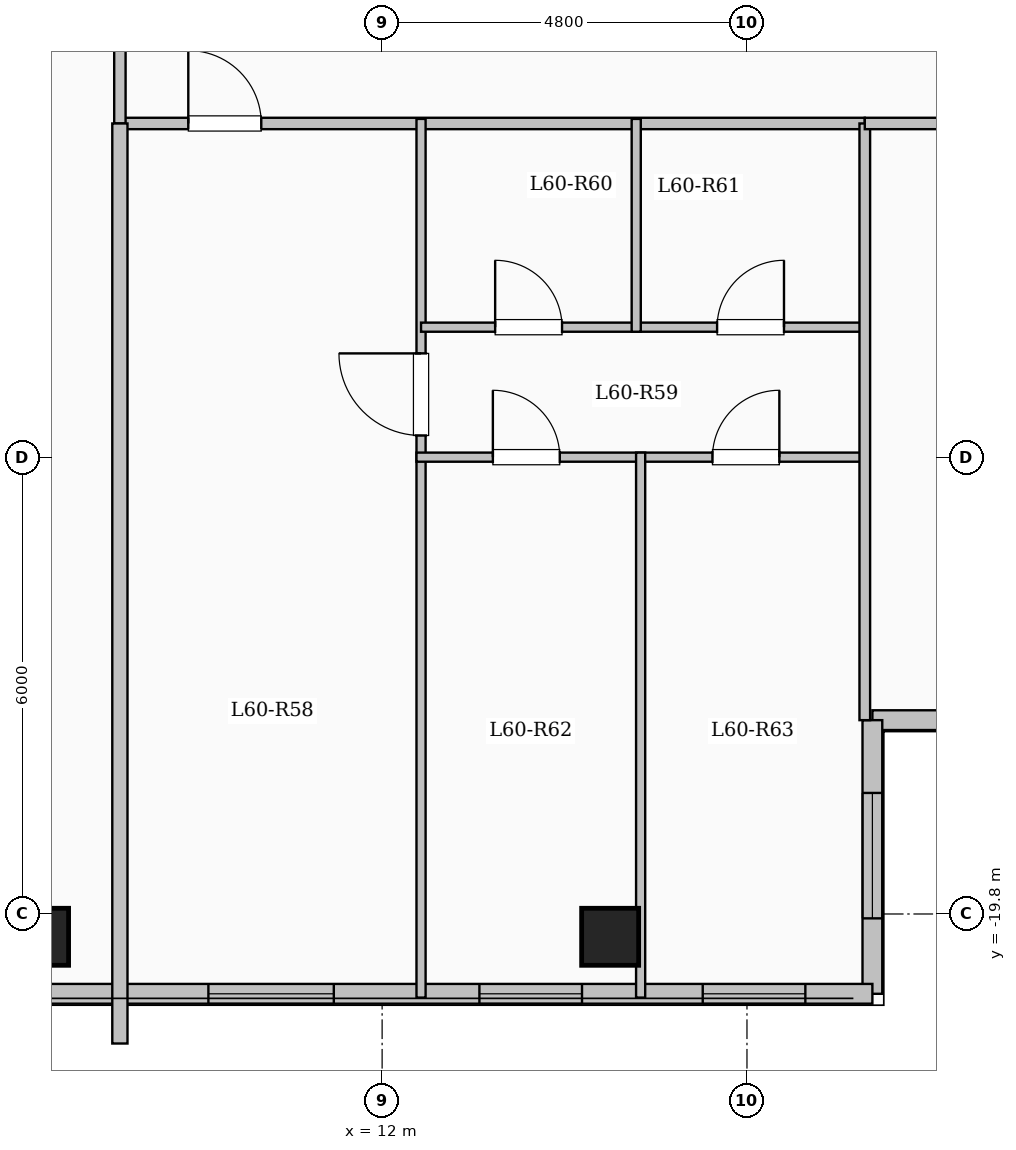
"""IFC4 building model, lengths in metres.
Left out: names, types, materials, properties, quantities, classifications, styles, units other than length and angle.
Written with IfcOpenShell. Run it as: python <this file> out.ifc"""

import sys

from ifc_helpers import new_model, si_unit, direction, frame, frame_2d, origin, origin_2d, place, context, subcontext, project, spatial, rectangle, extrude, element, fill, save


model = new_model("IFC4")
c1 = context("Model", 3, precision=1e-05, world=origin(), true_north=direction((0.0, 1.0)))
c2 = subcontext(c1, "Body", "Model", "MODEL_VIEW")
j1 = project(units=[si_unit("LENGTHUNIT", "METRE"), si_unit("PLANEANGLEUNIT", "RADIAN")], contexts=[c1])
p1 = place(None, origin())
s1 = spatial("IfcSite", under=j1, at=p1, CompositionType="ELEMENT")
p2 = place(p1, origin())
s2 = spatial("IfcBuilding", under=s1, at=p2, CompositionType="ELEMENT")
p3 = place(p2, frame((0.0, 0.0, 220.4)))
s3 = spatial("IfcBuildingStorey", under=s2, at=p3, CompositionType="ELEMENT", Elevation=220.4)
for number, where, z_axis, x_axis in (
    (1, (7.5, -20.1, 0.0), (0.0, 0.0, 1.0), (1.0, 0.0, 0.0)),
    (2, (15.0, -20.1, 0.0), (0.0, 0.0, 1.0), (1.0, 0.0, 0.0)),
):
    element("IfcColumn", number, at=place(p3, frame(where, z_axis=z_axis, x_axis=x_axis)), inside=s3, PredefinedType="COLUMN", context=c2, shape_type="SweptSolid", body=[
        extrude(rectangle(XDim=0.75, YDim=0.75, at=origin_2d()), origin(), (0.0, 0.0, 1.0), 3.35),
    ])
p4 = place(p3, frame((23.55, -17.25, 0.0), z_axis=(0.0, 0.0, 1.0), x_axis=(-1.0, 0.0, 0.0)))
e3 = element("IfcWall", 3, at=p4, inside=s3, PredefinedType="SOLIDWALL", context=c2, shape_type="SweptSolid", body=[
    extrude(rectangle(XDim=5.1, YDim=0.26, at=frame_2d((2.55, 0.0))), origin(), (0.0, 0.0, 1.0), 3.1),
])
p5 = place(p4, frame((1.475, 0.0, 0.9)))
e4 = element("IfcOpeningElement", 4, at=p5, cuts=e3, PredefinedType="OPENING", context=c2, shape_type="SweptSolid", body=[
    extrude(rectangle(XDim=2.2, YDim=1.75, at=frame_2d((1.1, 0.875))), frame((0.0, 0.14, 0.0), z_axis=(0.0, -1.0, 0.0), x_axis=(1.0, 0.0, 0.0)), (0.0, 0.0, 1.0), 0.28),
])
p6 = place(p3, frame((18.45, -17.25, 0.0), z_axis=(0.0, 0.0, 1.0), x_axis=(0.0, -1.0, 0.0)))
e5 = element("IfcWall", 5, at=p6, inside=s3, PredefinedType="SOLIDWALL", context=c2, shape_type="SweptSolid", body=[
    extrude(rectangle(XDim=3.6, YDim=0.26, at=frame_2d((1.8, 0.0))), origin(), (0.0, 0.0, 1.0), 3.1),
])
p7 = place(p6, frame((0.958, 0.0, 0.9)))
e6 = element("IfcOpeningElement", 6, at=p7, cuts=e5, PredefinedType="OPENING", context=c2, shape_type="SweptSolid", body=[
    extrude(rectangle(XDim=1.65, YDim=1.6, at=frame_2d((0.825, 0.8))), frame((0.0, 0.14, 0.0), z_axis=(0.0, -1.0, 0.0), x_axis=(1.0, 0.0, 0.0)), (0.0, 0.0, 1.0), 0.28),
])
p8 = place(p3, frame((18.45, -20.85, 0.0), z_axis=(0.0, 0.0, 1.0), x_axis=(-1.0, 0.0, 0.0)))
e7 = element("IfcWall", 7, at=p8, inside=s3, PredefinedType="SOLIDWALL", context=c2, shape_type="SweptSolid", body=[
    extrude(rectangle(XDim=11.1, YDim=0.26, at=frame_2d((5.55, 0.0))), origin(), (0.0, 0.0, 1.0), 3.1),
])
p9 = place(p8, frame((0.882, 0.0, 0.95)))
e8 = element("IfcOpeningElement", 8, at=p9, cuts=e7, PredefinedType="OPENING", context=c2, shape_type="SweptSolid", body=[
    extrude(rectangle(XDim=1.35, YDim=1.55, at=frame_2d((0.675, 0.775))), frame((0.0, 0.14, 0.0), z_axis=(0.0, -1.0, 0.0), x_axis=(1.0, 0.0, 0.0)), (0.0, 0.0, 1.0), 0.28),
])
p10 = place(p8, frame((3.82, 0.0, 0.95)))
e9 = element("IfcOpeningElement", 9, at=p10, cuts=e7, PredefinedType="OPENING", context=c2, shape_type="SweptSolid", body=[
    extrude(rectangle(XDim=1.35, YDim=1.55, at=frame_2d((0.675, 0.775))), frame((0.0, 0.14, 0.0), z_axis=(0.0, -1.0, 0.0), x_axis=(1.0, 0.0, 0.0)), (0.0, 0.0, 1.0), 0.28),
])
p11 = place(p8, frame((7.086, 0.0, 0.9)))
e10 = element("IfcOpeningElement", 10, at=p11, cuts=e7, PredefinedType="OPENING", context=c2, shape_type="SweptSolid", body=[
    extrude(rectangle(XDim=1.65, YDim=1.6, at=frame_2d((0.825, 0.8))), frame((0.0, 0.14, 0.0), z_axis=(0.0, -1.0, 0.0), x_axis=(1.0, 0.0, 0.0)), (0.0, 0.0, 1.0), 0.28),
])
p12 = place(p3, frame((8.55, -9.4, 0.0), z_axis=(0.0, 0.0, 1.0), x_axis=(1.0, 0.0, 0.0)))
e11 = element("IfcWall", 11, at=p12, inside=s3, PredefinedType="PARTITIONING", context=c2, shape_type="SweptSolid", body=[
    extrude(rectangle(XDim=9.8, YDim=0.15, at=frame_2d((4.9, 0.0))), origin(), (0.0, 0.0, 1.0), 3.1),
])
p13 = place(p12, frame((0.9, 0.0, 0.0)))
e12 = element("IfcOpeningElement", 12, at=p13, cuts=e11, PredefinedType="OPENING", context=c2, shape_type="SweptSolid", body=[
    extrude(rectangle(XDim=0.96, YDim=2.15, at=frame_2d((0.48, 1.075))), frame((0.0, 0.085, 0.0), z_axis=(0.0, -1.0, 0.0), x_axis=(1.0, 0.0, 0.0)), (0.0, 0.0, 1.0), 0.17),
])
p14 = place(p3, frame((8.55, -9.4, 0.0), z_axis=(0.0, 0.0, 1.0), x_axis=(0.0, 1.0, 0.0)))
e13 = element("IfcWall", 13, at=p14, inside=s3, PredefinedType="PARTITIONING", context=c2, shape_type="SweptSolid", body=[
    extrude(rectangle(XDim=2.15, YDim=0.15, at=frame_2d((1.075, 0.0))), origin(), (0.0, 0.0, 1.0), 3.1),
])
p15 = place(p3, frame((12.512, -20.9, 0.0), z_axis=(0.0, 0.0, 1.0), x_axis=(0.0, 1.0, 0.0)))
e14 = element("IfcWall", 14, at=p15, inside=s3, PredefinedType="PARTITIONING", context=c2, shape_type="SweptSolid", body=[
    extrude(rectangle(XDim=11.56, YDim=0.12, at=frame_2d((5.78, 0.0))), origin(), (0.0, 0.0, 1.0), 3.1),
])
p16 = place(p15, frame((7.395, 0.0, 0.0)))
e15 = element("IfcOpeningElement", 15, at=p16, cuts=e14, PredefinedType="OPENING", context=c2, shape_type="SweptSolid", body=[
    extrude(rectangle(XDim=1.08, YDim=2.15, at=frame_2d((0.54, 1.075))), frame((0.0, 0.07, 0.0), z_axis=(0.0, -1.0, 0.0), x_axis=(1.0, 0.0, 0.0)), (0.0, 0.0, 1.0), 0.14),
])
p17 = place(p3, frame((12.512, -12.08, 0.0), z_axis=(0.0, 0.0, 1.0), x_axis=(1.0, 0.0, 0.0)))
e16 = element("IfcWall", 16, at=p17, inside=s3, PredefinedType="PARTITIONING", context=c2, shape_type="SweptSolid", body=[
    extrude(rectangle(XDim=2.831, YDim=0.12, at=frame_2d((1.416, 0.0))), origin(), (0.0, 0.0, 1.0), 2.725),
])
p18 = place(p17, frame((0.975, 0.0, 0.0)))
e17 = element("IfcOpeningElement", 17, at=p18, cuts=e16, PredefinedType="OPENING", context=c2, shape_type="SweptSolid", body=[
    extrude(rectangle(XDim=0.88, YDim=2.1, at=frame_2d((0.44, 1.05))), frame((0.0, 0.07, 0.0), z_axis=(0.0, -1.0, 0.0), x_axis=(1.0, 0.0, 0.0)), (0.0, 0.0, 1.0), 0.14),
])
p19 = place(p3, frame((15.343, -12.08, 0.0), z_axis=(0.0, 0.0, 1.0), x_axis=(1.0, 0.0, 0.0)))
e18 = element("IfcWall", 18, at=p19, inside=s3, PredefinedType="PARTITIONING", context=c2, shape_type="SweptSolid", body=[
    extrude(rectangle(XDim=3.007, YDim=0.12, at=frame_2d((1.503, 0.0))), origin(), (0.0, 0.0, 1.0), 3.1),
])
p20 = place(p19, frame((1.064, 0.0, 0.0)))
e19 = element("IfcOpeningElement", 19, at=p20, cuts=e18, PredefinedType="OPENING", context=c2, shape_type="SweptSolid", body=[
    extrude(rectangle(XDim=0.88, YDim=2.1, at=frame_2d((0.44, 1.05))), frame((0.0, 0.07, 0.0), z_axis=(0.0, -1.0, 0.0), x_axis=(1.0, 0.0, 0.0)), (0.0, 0.0, 1.0), 0.14),
])
p21 = place(p3, frame((12.452, -13.79, 0.0), z_axis=(0.0, 0.0, 1.0), x_axis=(1.0, 0.0, 0.0)))
e20 = element("IfcWall", 20, at=p21, inside=s3, PredefinedType="PARTITIONING", context=c2, shape_type="SweptSolid", body=[
    extrude(rectangle(XDim=5.958, YDim=0.12, at=frame_2d((2.979, 0.0))), origin(), (0.0, 0.0, 1.0), 2.725),
])
p22 = place(p21, frame((1.005, 0.0, 0.0)))
e21 = element("IfcOpeningElement", 21, at=p22, cuts=e20, PredefinedType="OPENING", context=c2, shape_type="SweptSolid", body=[
    extrude(rectangle(XDim=0.88, YDim=2.1, at=frame_2d((0.44, 1.05))), frame((0.0, 0.07, 0.0), z_axis=(0.0, -1.0, 0.0), x_axis=(1.0, 0.0, 0.0)), (0.0, 0.0, 1.0), 0.14),
])
p23 = place(p21, frame((3.894, 0.0, 0.0)))
e22 = element("IfcOpeningElement", 22, at=p23, cuts=e20, PredefinedType="OPENING", context=c2, shape_type="SweptSolid", body=[
    extrude(rectangle(XDim=0.88, YDim=2.1, at=frame_2d((0.44, 1.05))), frame((0.0, 0.07, 0.0), z_axis=(0.0, -1.0, 0.0), x_axis=(1.0, 0.0, 0.0)), (0.0, 0.0, 1.0), 0.14),
])
p24 = place(p3, frame((15.343, -12.14, 0.0), z_axis=(0.0, 0.0, 1.0), x_axis=(0.0, 1.0, 0.0)))
e23 = element("IfcWall", 23, at=p24, inside=s3, PredefinedType="PARTITIONING", context=c2, shape_type="SweptSolid", body=[
    extrude(rectangle(XDim=2.8, YDim=0.12, at=frame_2d((1.4, 0.0))), origin(), (0.0, 0.0, 1.0), 3.1),
])
p25 = place(p3, frame((15.401, -20.9, 0.0), z_axis=(0.0, 0.0, 1.0), x_axis=(0.0, 1.0, 0.0)))
e24 = element("IfcWall", 24, at=p25, inside=s3, PredefinedType="PARTITIONING", context=c2, shape_type="SweptSolid", body=[
    extrude(rectangle(XDim=7.17, YDim=0.12, at=frame_2d((3.585, 0.0))), origin(), (0.0, 0.0, 1.0), 3.1),
])
p26 = place(p3, frame((8.55, -21.504, 0.0), z_axis=(0.0, 0.0, 1.0), x_axis=(0.0, 1.0, 0.0)))
e25 = element("IfcWall", 25, at=p26, inside=s3, PredefinedType="SOLIDWALL", context=c2, shape_type="SweptSolid", body=[
    extrude(rectangle(XDim=12.104, YDim=0.2, at=frame_2d((6.052, 0.0))), origin(), (0.0, 0.0, 1.0), 3.1),
])
p27 = place(p3, frame((18.35, -17.25, 0.0), z_axis=(0.0, 0.0, 1.0), x_axis=(0.0, 1.0, 0.0)))
e26 = element("IfcWall", 26, at=p27, inside=s3, PredefinedType="PARTITIONING", context=c2, shape_type="SweptSolid", body=[
    extrude(rectangle(XDim=7.85, YDim=0.14, at=frame_2d((3.925, 0.0))), origin(), (0.0, 0.0, 1.0), 3.1),
])
p28 = place(p3, frame((18.35, -9.4, 0.0), z_axis=(0.0, 0.0, 1.0), x_axis=(1.0, 0.0, 0.0)))
e27 = element("IfcWall", 27, at=p28, inside=s3, PredefinedType="PARTITIONING", context=c2, shape_type="SweptSolid", body=[
    extrude(rectangle(XDim=5.23, YDim=0.15, at=frame_2d((2.615, 0.0))), origin(), (0.0, 0.0, 1.0), 3.1),
])
p29 = place(p28, frame((2.14, 0.0, 0.0)))
e28 = element("IfcOpeningElement", 28, at=p29, cuts=e27, PredefinedType="OPENING", context=c2, shape_type="SweptSolid", body=[
    extrude(rectangle(XDim=0.95, YDim=2.15, at=frame_2d((0.475, 1.075))), frame((0.0, 0.085, 0.0), z_axis=(0.0, -1.0, 0.0), x_axis=(1.0, 0.0, 0.0)), (0.0, 0.0, 1.0), 0.17),
])
p30 = place(p7, origin())
e29 = element("IfcWindow", 29, at=p30, inside=s3, PartitioningType="SINGLE_PANEL", PredefinedType="WINDOW", context=c2, shape_type="SweptSolid", body=[
    extrude(rectangle(XDim=1.65, YDim=1.6, at=frame_2d((0.825, 0.8))), frame((0.0, 0.03, 0.0), z_axis=(0.0, -1.0, 0.0), x_axis=(1.0, 0.0, 0.0)), (0.0, 0.0, 1.0), 0.06),
])
fill(e6, e29)
p31 = place(p9, origin())
e30 = element("IfcWindow", 30, at=p31, inside=s3, PartitioningType="SINGLE_PANEL", PredefinedType="WINDOW", context=c2, shape_type="SweptSolid", body=[
    extrude(rectangle(XDim=1.35, YDim=1.55, at=frame_2d((0.675, 0.775))), frame((0.0, 0.03, 0.0), z_axis=(0.0, -1.0, 0.0), x_axis=(1.0, 0.0, 0.0)), (0.0, 0.0, 1.0), 0.06),
])
fill(e8, e30)
p32 = place(p10, origin())
e31 = element("IfcWindow", 31, at=p32, inside=s3, PartitioningType="SINGLE_PANEL", PredefinedType="WINDOW", context=c2, shape_type="SweptSolid", body=[
    extrude(rectangle(XDim=1.35, YDim=1.55, at=frame_2d((0.675, 0.775))), frame((0.0, 0.03, 0.0), z_axis=(0.0, -1.0, 0.0), x_axis=(1.0, 0.0, 0.0)), (0.0, 0.0, 1.0), 0.06),
])
fill(e9, e31)
p33 = place(p11, origin())
e32 = element("IfcWindow", 32, at=p33, inside=s3, PartitioningType="SINGLE_PANEL", PredefinedType="WINDOW", context=c2, shape_type="SweptSolid", body=[
    extrude(rectangle(XDim=1.65, YDim=1.6, at=frame_2d((0.825, 0.8))), frame((0.0, 0.03, 0.0), z_axis=(0.0, -1.0, 0.0), x_axis=(1.0, 0.0, 0.0)), (0.0, 0.0, 1.0), 0.06),
])
fill(e10, e32)
p34 = place(p13, origin())
e33 = element("IfcDoor", 33, at=p34, inside=s3, OperationType="SINGLE_SWING_LEFT", PredefinedType="DOOR", context=c2, shape_type="SweptSolid", body=[
    extrude(rectangle(XDim=0.96, YDim=2.15, at=frame_2d((0.48, 1.075))), frame((0.0, 0.025, 0.0), z_axis=(0.0, -1.0, 0.0), x_axis=(1.0, 0.0, 0.0)), (0.0, 0.0, 1.0), 0.05),
])
fill(e12, e33)
p35 = place(p16, origin())
e34 = element("IfcDoor", 34, at=p35, inside=s3, OperationType="SINGLE_SWING_RIGHT", PredefinedType="DOOR", context=c2, shape_type="SweptSolid", body=[
    extrude(rectangle(XDim=1.08, YDim=2.15, at=frame_2d((0.54, 1.075))), frame((0.0, 0.025, 0.0), z_axis=(0.0, -1.0, 0.0), x_axis=(1.0, 0.0, 0.0)), (0.0, 0.0, 1.0), 0.05),
])
fill(e15, e34)
p36 = place(p18, origin())
e35 = element("IfcDoor", 35, at=p36, inside=s3, OperationType="SINGLE_SWING_LEFT", PredefinedType="DOOR", context=c2, shape_type="SweptSolid", body=[
    extrude(rectangle(XDim=0.88, YDim=2.1, at=frame_2d((0.44, 1.05))), frame((0.0, 0.025, 0.0), z_axis=(0.0, -1.0, 0.0), x_axis=(1.0, 0.0, 0.0)), (0.0, 0.0, 1.0), 0.05),
])
fill(e17, e35)
p37 = place(p20, origin())
e36 = element("IfcDoor", 36, at=p37, inside=s3, OperationType="SINGLE_SWING_RIGHT", PredefinedType="DOOR", context=c2, shape_type="SweptSolid", body=[
    extrude(rectangle(XDim=0.88, YDim=2.1, at=frame_2d((0.44, 1.05))), frame((0.0, 0.025, 0.0), z_axis=(0.0, -1.0, 0.0), x_axis=(1.0, 0.0, 0.0)), (0.0, 0.0, 1.0), 0.05),
])
fill(e19, e36)
p38 = place(p22, origin())
e37 = element("IfcDoor", 37, at=p38, inside=s3, OperationType="SINGLE_SWING_LEFT", PredefinedType="DOOR", context=c2, shape_type="SweptSolid", body=[
    extrude(rectangle(XDim=0.88, YDim=2.1, at=frame_2d((0.44, 1.05))), frame((0.0, 0.025, 0.0), z_axis=(0.0, -1.0, 0.0), x_axis=(1.0, 0.0, 0.0)), (0.0, 0.0, 1.0), 0.05),
])
fill(e21, e37)
p39 = place(p23, origin())
e38 = element("IfcDoor", 38, at=p39, inside=s3, OperationType="SINGLE_SWING_RIGHT", PredefinedType="DOOR", context=c2, shape_type="SweptSolid", body=[
    extrude(rectangle(XDim=0.88, YDim=2.1, at=frame_2d((0.44, 1.05))), frame((0.0, 0.025, 0.0), z_axis=(0.0, -1.0, 0.0), x_axis=(1.0, 0.0, 0.0)), (0.0, 0.0, 1.0), 0.05),
])
fill(e22, e38)
save(model, sys.argv[1])
